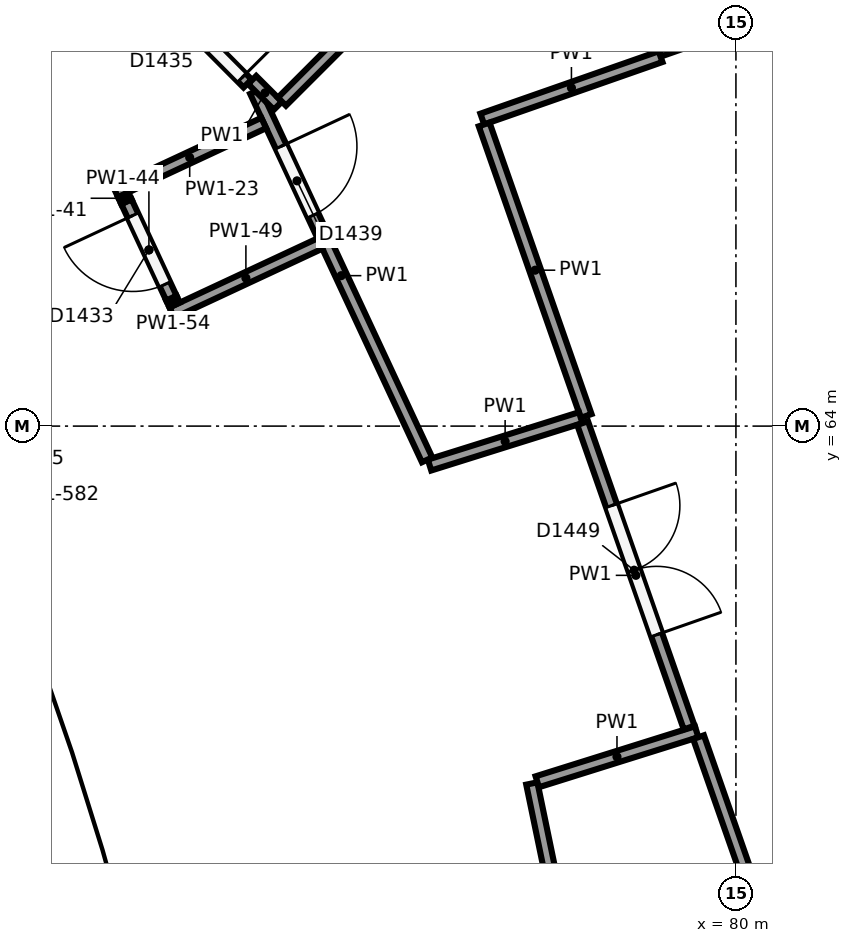
"""IFC4 building model, lengths in metres.
Left out: names, types, materials, properties, quantities, classifications, styles, units other than length and angle.
Written with IfcOpenShell. Run it as: python <this file> out.ifc"""

import sys

from ifc_helpers import new_model, si_unit, direction, frame, frame_2d, origin, origin_2d, place, context, subcontext, project, spatial, rectangle, circle, extrude, element, fill, save


model = new_model("IFC4")
c1 = context("Model", 3, precision=1e-05, world=origin(), true_north=direction((0.0, 1.0)))
c2 = subcontext(c1, "Body", "Model", "MODEL_VIEW")
j1 = project(units=[si_unit("LENGTHUNIT", "METRE"), si_unit("PLANEANGLEUNIT", "RADIAN")], contexts=[c1])
p1 = place(None, origin())
s1 = spatial("IfcSite", under=j1, at=p1, CompositionType="ELEMENT")
p2 = place(p1, origin())
s2 = spatial("IfcBuilding", under=s1, at=p2, CompositionType="ELEMENT")
p3 = place(p2, frame((0.0, 0.0, 18.0)))
s3 = spatial("IfcBuildingStorey", under=s2, at=p3, CompositionType="ELEMENT", Elevation=18.0)
p4 = place(p3, frame((71.17, 59.677, 0.0), z_axis=(0.0, 0.0, 1.0), x_axis=(1.0, 0.0, 0.0)))
e1 = element("IfcColumn", 1, at=p4, inside=s3, PredefinedType="COLUMN", context=c2, shape_type="SweptSolid", body=[
    extrude(circle(Radius=0.45, at=origin_2d()), origin(), (0.0, 0.0, 1.0), 3.698),
])
p5 = place(p3, frame((78.572, 53.229, 0.0), z_axis=(0.0, 0.0, 1.0), x_axis=(-0.202912951915, 0.979196779991, 0.0)))
e2 = element("IfcWall", 2, at=p5, inside=s3, PredefinedType="PARTITIONING", context=c2, shape_type="SweptSolid", body=[
    extrude(rectangle(XDim=6.199, YDim=0.15, at=frame_2d((3.099, 0.0))), origin(), (0.0, 0.0, 1.0), 5.6),
])
p6 = place(p3, frame((77.386, 59.321, 0.0), z_axis=(0.0, 0.0, 1.0), x_axis=(0.954196869379, 0.299179435235, 0.0)))
e3 = element("IfcWall", 3, at=p6, inside=s3, PredefinedType="PARTITIONING", context=c2, shape_type="SweptSolid", body=[
    extrude(rectangle(XDim=2.198, YDim=0.15, at=frame_2d((1.099, 0.0))), origin(), (0.0, 0.0, 1.0), 5.6),
])
p7 = place(p3, frame((79.508, 59.907, 0.0), z_axis=(0.0, 0.0, 1.0), x_axis=(0.330291692253, -0.943878910681, 0.0)))
e4 = element("IfcWall", 4, at=p7, inside=s3, PredefinedType="PARTITIONING", context=c2, shape_type="SweptSolid", body=[
    extrude(rectangle(XDim=5.185, YDim=0.15, at=frame_2d((2.592, 0.0))), origin(), (0.0, 0.0, 1.0), 5.6),
])
p8 = place(p3, frame((79.009, 68.861, 0.0), z_axis=(0.0, 0.0, 1.0), x_axis=(-0.943873667714, -0.330306674768, 0.0)))
e5 = element("IfcWall", 5, at=p8, inside=s3, PredefinedType="PARTITIONING", context=c2, shape_type="SweptSolid", body=[
    extrude(rectangle(XDim=2.486, YDim=0.15, at=frame_2d((1.243, 0.0))), origin(), (0.0, 0.0, 1.0), 5.6),
])
p9 = place(p3, frame((76.688, 67.969, 0.0), z_axis=(0.0, 0.0, 1.0), x_axis=(0.330235334568, -0.943898630046, 0.0)))
e6 = element("IfcWall", 6, at=p9, inside=s3, PredefinedType="PARTITIONING", context=c2, shape_type="SweptSolid", body=[
    extrude(rectangle(XDim=4.063, YDim=0.15, at=frame_2d((2.032, 0.0))), origin(), (0.0, 0.0, 1.0), 5.6),
])
p10 = place(p3, frame((77.958, 64.111, 0.0), z_axis=(0.0, 0.0, 1.0), x_axis=(-0.954210746555, -0.299135172051, 0.0)))
e7 = element("IfcWall", 7, at=p10, inside=s3, PredefinedType="PARTITIONING", context=c2, shape_type="SweptSolid", body=[
    extrude(rectangle(XDim=2.084, YDim=0.15, at=frame_2d((1.042, 0.0))), origin(), (0.0, 0.0, 1.0), 5.6),
])
p11 = place(p3, frame((75.937, 63.556, 0.0), z_axis=(0.0, 0.0, 1.0), x_axis=(-0.422630512429, 0.906302074346, 0.0)))
e8 = element("IfcWall", 8, at=p11, inside=s3, PredefinedType="PARTITIONING", context=c2, shape_type="SweptSolid", body=[
    extrude(rectangle(XDim=5.347, YDim=0.15, at=frame_2d((2.674, 0.0))), origin(), (0.0, 0.0, 1.0), 5.6),
])
p12 = place(p11, frame((3.55, 0.0, 0.0)))
e9 = element("IfcOpeningElement", 9, at=p12, cuts=e8, PredefinedType="OPENING", context=c2, shape_type="SweptSolid", body=[
    extrude(rectangle(XDim=1.0, YDim=2.1, at=frame_2d((0.5, 1.05))), frame((0.0, 0.085, 0.0), z_axis=(0.0, -1.0, 0.0), x_axis=(1.0, 0.0, 0.0)), (0.0, 0.0, 1.0), 0.17),
])
p13 = place(p3, frame((73.635, 68.554, 0.0), z_axis=(0.0, 0.0, 1.0), x_axis=(0.707106781187, -0.707106781187, 0.0)))
e10 = element("IfcWall", 10, at=p13, inside=s3, PredefinedType="PARTITIONING", context=c2, shape_type="SweptSolid", body=[
    extrude(rectangle(XDim=0.478, YDim=0.15, at=frame_2d((0.239, 0.0))), origin(), (0.0, 0.0, 1.0), 5.6),
])
p14 = place(p3, frame((74.027, 68.269, 0.0), z_axis=(0.0, 0.0, 1.0), x_axis=(0.707106781187, 0.707106781187, 0.0)))
e11 = element("IfcWall", 11, at=p14, inside=s3, PredefinedType="PARTITIONING", context=c2, shape_type="SweptSolid", body=[
    extrude(rectangle(XDim=2.812, YDim=0.15, at=frame_2d((1.406, 0.0))), origin(), (0.0, 0.0, 1.0), 5.6),
])
p15 = place(p3, frame((79.913, 69.256, 0.0), z_axis=(0.0, 0.0, 1.0), x_axis=(-0.943893508812, -0.330249972024, 0.0)))
e12 = element("IfcWall", 12, at=p15, inside=s3, PredefinedType="PARTITIONING", context=c2, shape_type="SweptSolid", body=[
    extrude(rectangle(XDim=0.974, YDim=0.15, at=frame_2d((0.487, 0.0))), origin(), (0.0, 0.0, 1.0), 4.7),
])
p16 = place(p3, frame((77.983, 64.039, 0.0), z_axis=(0.0, 0.0, 1.0), x_axis=(0.330276109597, -0.943884363378, 0.0)))
e13 = element("IfcWall", 13, at=p16, inside=s3, PredefinedType="PARTITIONING", context=c2, shape_type="SweptSolid", body=[
    extrude(rectangle(XDim=4.244, YDim=0.15, at=frame_2d((2.122, 0.0))), origin(), (0.0, 0.0, 1.0), 5.6),
])
p17 = place(p16, frame((1.15, 0.0, 0.0)))
e14 = element("IfcOpeningElement", 14, at=p17, cuts=e13, PredefinedType="OPENING", context=c2, shape_type="SweptSolid", body=[
    extrude(rectangle(XDim=1.8, YDim=2.1, at=frame_2d((0.9, 1.05))), frame((0.0, 0.085, 0.0), z_axis=(0.0, -1.0, 0.0), x_axis=(1.0, 0.0, 0.0)), (0.0, 0.0, 1.0), 0.17),
])
p18 = place(p3, frame((64.152, 77.974, 0.0), z_axis=(0.0, 0.0, 1.0), x_axis=(0.705496399325, -0.70871350385, 0.0)))
e15 = element("IfcWall", 15, at=p18, inside=s3, PredefinedType="PARTITIONING", context=c2, shape_type="SweptSolid", body=[
    extrude(rectangle(XDim=13.356, YDim=0.15, at=frame_2d((6.678, 0.0))), origin(), (0.0, 0.0, 1.0), 5.6),
])
p19 = place(p18, frame((4.85, 0.0, 0.0)))
e16 = element("IfcOpeningElement", 16, at=p19, cuts=e15, PredefinedType="OPENING", context=c2, shape_type="SweptSolid", body=[
    extrude(rectangle(XDim=1.8, YDim=2.1, at=frame_2d((0.9, 1.05))), frame((0.0, 0.085, 0.0), z_axis=(0.0, -1.0, 0.0), x_axis=(1.0, 0.0, 0.0)), (0.0, 0.0, 1.0), 0.17),
])
p20 = place(p18, frame((11.45, 0.0, 0.0)))
e17 = element("IfcOpeningElement", 17, at=p20, cuts=e15, PredefinedType="OPENING", context=c2, shape_type="SweptSolid", body=[
    extrude(rectangle(XDim=1.8, YDim=2.1, at=frame_2d((0.9, 1.05))), frame((0.0, 0.085, 0.0), z_axis=(0.0, -1.0, 0.0), x_axis=(1.0, 0.0, 0.0)), (0.0, 0.0, 1.0), 0.17),
])
p21 = place(p3, frame((74.527, 66.402, 0.0), z_axis=(0.0, 0.0, 1.0), x_axis=(-0.906290450236, -0.422655438639, 0.0)))
e18 = element("IfcWall", 18, at=p21, inside=s3, PredefinedType="PARTITIONING", context=c2, shape_type="SweptSolid", body=[
    extrude(rectangle(XDim=2.15, YDim=0.15, at=frame_2d((1.075, 0.0))), origin(), (0.0, 0.0, 1.0), 5.713),
])
p22 = place(p3, frame((73.787, 67.988, 0.0), z_axis=(0.0, 0.0, 1.0), x_axis=(-0.906290450236, -0.422655438639, 0.0)))
e19 = element("IfcWall", 19, at=p22, inside=s3, PredefinedType="PARTITIONING", context=c2, shape_type="SweptSolid", body=[
    extrude(rectangle(XDim=2.15, YDim=0.15, at=frame_2d((1.075, 0.0))), origin(), (0.0, 0.0, 1.0), 5.646),
])
p23 = place(p3, frame((72.615, 65.593, 0.0), z_axis=(0.0, 0.0, 1.0), x_axis=(-0.422617978463, 0.906307919131, 0.0)))
e20 = element("IfcWall", 20, at=p23, inside=s3, PredefinedType="PARTITIONING", context=c2, shape_type="SweptSolid", body=[
    extrude(rectangle(XDim=0.1, YDim=0.15, at=frame_2d((0.05, 0.0))), origin(), (0.0, 0.0, 1.0), 5.743),
])
p24 = place(p3, frame((72.573, 65.684, 0.0), z_axis=(0.0, 0.0, 1.0), x_axis=(-0.422704073219, 0.906267767541, 0.0)))
e21 = element("IfcWall", 21, at=p24, inside=s3, PredefinedType="PARTITIONING", context=c2, shape_type="SweptSolid", body=[
    extrude(rectangle(XDim=1.4, YDim=0.15, at=frame_2d((0.7, 0.0))), origin(), (0.0, 0.0, 1.0), 5.7),
])
p25 = place(p24, frame((0.2, 0.0, 0.0)))
e22 = element("IfcOpeningElement", 22, at=p25, cuts=e21, PredefinedType="OPENING", context=c2, shape_type="SweptSolid", body=[
    extrude(rectangle(XDim=1.0, YDim=2.1, at=frame_2d((0.5, 1.05))), frame((0.0, 0.085, 0.0), z_axis=(0.0, -1.0, 0.0), x_axis=(1.0, 0.0, 0.0)), (0.0, 0.0, 1.0), 0.17),
])
p26 = place(p3, frame((71.981, 66.952, 0.0), z_axis=(0.0, 0.0, 1.0), x_axis=(-0.422617978463, 0.906307919131, 0.0)))
e23 = element("IfcWall", 23, at=p26, inside=s3, PredefinedType="PARTITIONING", context=c2, shape_type="SweptSolid", body=[
    extrude(rectangle(XDim=0.1, YDim=0.15, at=frame_2d((0.05, 0.0))), origin(), (0.0, 0.0, 1.0), 5.696),
])
p27 = place(p12, frame((1.0, 0.0, 0.0), z_axis=(0.0, 0.0, 1.0), x_axis=(-1.0, 0.0, 0.0)))
e24 = element("IfcDoor", 24, at=p27, inside=s3, OperationType="SINGLE_SWING_LEFT", PredefinedType="DOOR", context=c2, shape_type="SweptSolid", body=[
    extrude(rectangle(XDim=1.0, YDim=2.1, at=frame_2d((0.5, 1.05))), frame((0.0, 0.025, 0.0), z_axis=(0.0, -1.0, 0.0), x_axis=(1.0, 0.0, 0.0)), (0.0, 0.0, 1.0), 0.05),
])
fill(e9, e24)
p28 = place(p17, origin())
e25 = element("IfcDoor", 25, at=p28, inside=s3, OperationType="DOUBLE_DOOR_SINGLE_SWING", PredefinedType="DOOR", context=c2, shape_type="SweptSolid", body=[
    extrude(rectangle(XDim=1.8, YDim=2.1, at=frame_2d((0.9, 1.05))), frame((0.0, 0.025, 0.0), z_axis=(0.0, -1.0, 0.0), x_axis=(1.0, 0.0, 0.0)), (0.0, 0.0, 1.0), 0.05),
])
fill(e14, e25)
p29 = place(p20, origin())
e26 = element("IfcDoor", 26, at=p29, inside=s3, OperationType="DOUBLE_DOOR_SINGLE_SWING", PredefinedType="DOOR", context=c2, shape_type="SweptSolid", body=[
    extrude(rectangle(XDim=1.8, YDim=2.1, at=frame_2d((0.9, 1.05))), frame((0.0, 0.025, 0.0), z_axis=(0.0, -1.0, 0.0), x_axis=(1.0, 0.0, 0.0)), (0.0, 0.0, 1.0), 0.05),
])
fill(e17, e26)
p30 = place(p25, origin())
e27 = element("IfcDoor", 27, at=p30, inside=s3, OperationType="SINGLE_SWING_RIGHT", PredefinedType="DOOR", context=c2, shape_type="SweptSolid", body=[
    extrude(rectangle(XDim=1.0, YDim=2.1, at=frame_2d((0.5, 1.05))), frame((0.0, 0.025, 0.0), z_axis=(0.0, -1.0, 0.0), x_axis=(1.0, 0.0, 0.0)), (0.0, 0.0, 1.0), 0.05),
])
fill(e22, e27)
save(model, sys.argv[1])
